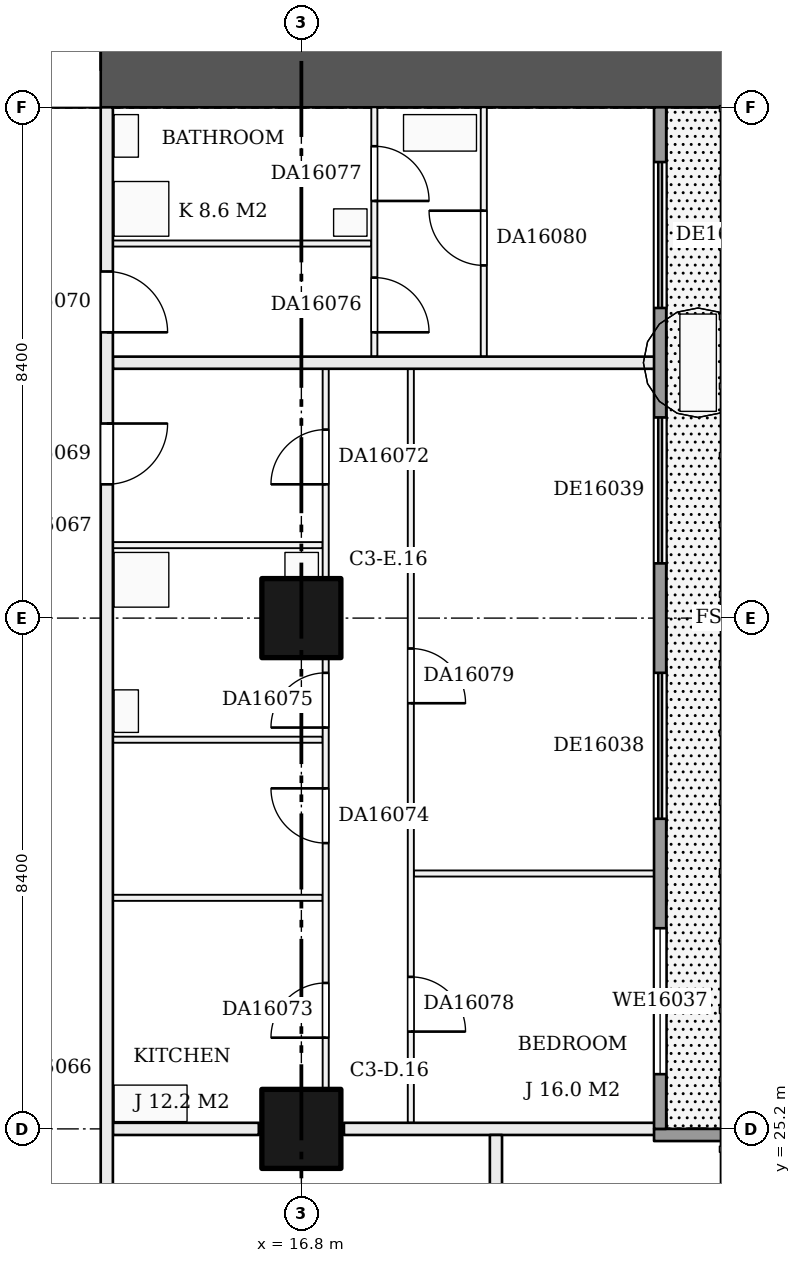
"""IFC4 building model, lengths in metres.
Left out: names, types, materials, properties, quantities, classifications, styles, units other than length and angle.
Written with IfcOpenShell. Run it as: python <this file> out.ifc"""

import sys

from ifc_helpers import new_model, si_unit, direction, frame, frame_2d, origin, origin_2d, place, context, subcontext, project, spatial, rectangle, extrude, element, fill, save


model = new_model("IFC4")
c1 = context("Model", 3, precision=1e-05, world=origin(), true_north=direction((0.0, 1.0)))
c2 = subcontext(c1, "Body", "Model", "MODEL_VIEW")
j1 = project(units=[si_unit("LENGTHUNIT", "METRE"), si_unit("PLANEANGLEUNIT", "RADIAN")], contexts=[c1])
p1 = place(None, origin())
s1 = spatial("IfcSite", under=j1, at=p1, CompositionType="ELEMENT")
p2 = place(p1, origin())
s2 = spatial("IfcBuilding", under=s1, at=p2, CompositionType="ELEMENT")
p3 = place(p2, frame((0.0, 0.0, 67.2)))
s3 = spatial("IfcBuildingStorey", under=s2, at=p3, CompositionType="ELEMENT", Elevation=67.2)
for number, where, z_axis, x_axis in (
    (1, (16.8, 25.2, 0.0), (0.0, 0.0, 1.0), (1.0, 0.0, 0.0)),
    (2, (16.8, 33.6, 0.0), (0.0, 0.0, 1.0), (1.0, 0.0, 0.0)),
):
    element("IfcColumn", number, at=place(p3, frame(where, z_axis=z_axis, x_axis=x_axis)), inside=s3, PredefinedType="COLUMN", context=c2, shape_type="SweptSolid", body=[
        extrude(rectangle(XDim=1.3, YDim=1.3, at=origin_2d()), origin(), (0.0, 0.0, 1.0), 3.22),
    ])
p4 = place(p3, frame((9.6, 42.6, 0.0), z_axis=(0.0, 0.0, 1.0), x_axis=(1.0, 0.0, 0.0)))
e3 = element("IfcWall", 3, at=p4, inside=s3, PredefinedType="SHEAR", context=c2, shape_type="SweptSolid", body=[
    extrude(rectangle(XDim=14.4, YDim=1.2, at=frame_2d((7.2, 0.0))), origin(), (0.0, 0.0, 1.0), 3.22),
])
p5 = place(p4, frame((2.1, 0.0, 0.0)))
e4 = element("IfcOpeningElement", 4, at=p5, cuts=e3, PredefinedType="OPENING", context=c2, shape_type="SweptSolid", body=[
    extrude(rectangle(XDim=1.8, YDim=2.1, at=frame_2d((0.9, 1.05))), frame((0.0, 0.61, 0.0), z_axis=(0.0, -1.0, 0.0), x_axis=(1.0, 0.0, 0.0)), (0.0, 0.0, 1.0), 1.22),
])
p6 = place(p3, frame((13.7, 25.2, 0.0), z_axis=(0.0, 0.0, 1.0), x_axis=(1.0, 0.0, 0.0)))
e5 = element("IfcWall", 5, at=p6, inside=s3, PredefinedType="PARTITIONING", context=c2, shape_type="SweptSolid", body=[
    extrude(rectangle(XDim=2.4, YDim=0.2, at=frame_2d((1.2, 0.0))), origin(), (0.0, 0.0, 1.0), 3.22),
])
p7 = place(p3, frame((17.5, 25.2, 0.0), z_axis=(0.0, 0.0, 1.0), x_axis=(1.0, 0.0, 0.0)))
e6 = element("IfcWall", 6, at=p7, inside=s3, PredefinedType="PARTITIONING", context=c2, shape_type="SweptSolid", body=[
    extrude(rectangle(XDim=5.2, YDim=0.2, at=frame_2d((2.6, 0.0))), origin(), (0.0, 0.0, 1.0), 3.22),
])
p8 = place(p3, frame((13.7, 29.0, 0.0), z_axis=(0.0, 0.0, 1.0), x_axis=(1.0, 0.0, 0.0)))
e7 = element("IfcWall", 7, at=p8, inside=s3, PredefinedType="PARTITIONING", context=c2, shape_type="SweptSolid", body=[
    extrude(rectangle(XDim=3.45, YDim=0.1, at=frame_2d((1.725, 0.0))), origin(), (0.0, 0.0, 1.0), 3.22),
])
p9 = place(p3, frame((18.65, 29.4, 0.0), z_axis=(0.0, 0.0, 1.0), x_axis=(1.0, 0.0, 0.0)))
e8 = element("IfcWall", 8, at=p9, inside=s3, PredefinedType="PARTITIONING", context=c2, shape_type="SweptSolid", body=[
    extrude(rectangle(XDim=4.05, YDim=0.1, at=frame_2d((2.025, 0.0))), origin(), (0.0, 0.0, 1.0), 3.22),
])
for number, where, z_axis, x_axis in (
    (9, (13.7, 31.6, 0.0), (0.0, 0.0, 1.0), (1.0, 0.0, 0.0)),
    (10, (13.7, 34.8, 0.0), (0.0, 0.0, 1.0), (1.0, 0.0, 0.0)),
):
    element("IfcWall", number, at=place(p3, frame(where, z_axis=z_axis, x_axis=x_axis)), inside=s3, PredefinedType="PARTITIONING", context=c2, shape_type="SweptSolid", body=[
        extrude(rectangle(XDim=3.45, YDim=0.1, at=frame_2d((1.725, 0.0))), origin(), (0.0, 0.0, 1.0), 3.22),
    ])
p10 = place(p3, frame((13.7, 37.8, 0.0), z_axis=(0.0, 0.0, 1.0), x_axis=(1.0, 0.0, 0.0)))
e11 = element("IfcWall", 11, at=p10, inside=s3, PredefinedType="PARTITIONING", context=c2, shape_type="SweptSolid", body=[
    extrude(rectangle(XDim=9.0, YDim=0.2, at=frame_2d((4.5, 0.0))), origin(), (0.0, 0.0, 1.0), 3.22),
])
p11 = place(p3, frame((13.7, 39.76, 0.0), z_axis=(0.0, 0.0, 1.0), x_axis=(1.0, 0.0, 0.0)))
e12 = element("IfcWall", 12, at=p11, inside=s3, PredefinedType="PARTITIONING", context=c2, shape_type="SweptSolid", body=[
    extrude(rectangle(XDim=4.25, YDim=0.1, at=frame_2d((2.125, 0.0))), origin(), (0.0, 0.0, 1.0), 3.22),
])
p12 = place(p3, frame((13.6, 20.8, 0.0), z_axis=(0.0, 0.0, 1.0), x_axis=(0.0, 1.0, 0.0)))
e13 = element("IfcWall", 13, at=p12, inside=s3, PredefinedType="PARTITIONING", context=c2, shape_type="SweptSolid", body=[
    extrude(rectangle(XDim=21.2, YDim=0.2, at=frame_2d((10.6, 0.0))), origin(), (0.0, 0.0, 1.0), 3.22),
])
p13 = place(p12, frame((15.0, 0.0, 0.0)))
e14 = element("IfcOpeningElement", 14, at=p13, cuts=e13, PredefinedType="OPENING", context=c2, shape_type="SweptSolid", body=[
    extrude(rectangle(XDim=1.0, YDim=2.1, at=frame_2d((0.5, 1.05))), frame((0.0, 0.11, 0.0), z_axis=(0.0, -1.0, 0.0), x_axis=(1.0, 0.0, 0.0)), (0.0, 0.0, 1.0), 0.22),
])
p14 = place(p12, frame((17.5, 0.0, 0.0)))
e15 = element("IfcOpeningElement", 15, at=p14, cuts=e13, PredefinedType="OPENING", context=c2, shape_type="SweptSolid", body=[
    extrude(rectangle(XDim=1.0, YDim=2.1, at=frame_2d((0.5, 1.05))), frame((0.0, 0.11, 0.0), z_axis=(0.0, -1.0, 0.0), x_axis=(1.0, 0.0, 0.0)), (0.0, 0.0, 1.0), 0.22),
])
p15 = place(p12, frame((1.7, 0.0, 0.0)))
e16 = element("IfcOpeningElement", 16, at=p15, cuts=e13, PredefinedType="OPENING", context=c2, shape_type="SweptSolid", body=[
    extrude(rectangle(XDim=1.0, YDim=2.1, at=frame_2d((0.5, 1.05))), frame((0.0, 0.11, 0.0), z_axis=(0.0, -1.0, 0.0), x_axis=(1.0, 0.0, 0.0)), (0.0, 0.0, 1.0), 0.22),
])
p16 = place(p3, frame((17.2, 25.3, 0.0), z_axis=(0.0, 0.0, 1.0), x_axis=(0.0, 1.0, 0.0)))
e17 = element("IfcWall", 17, at=p16, inside=s3, PredefinedType="PARTITIONING", context=c2, shape_type="SweptSolid", body=[
    extrude(rectangle(XDim=12.4, YDim=0.1, at=frame_2d((6.2, 0.0))), origin(), (0.0, 0.0, 1.0), 3.22),
])
p17 = place(p16, frame((10.5, 0.0, 0.0)))
e18 = element("IfcOpeningElement", 18, at=p17, cuts=e17, PredefinedType="OPENING", context=c2, shape_type="SweptSolid", body=[
    extrude(rectangle(XDim=0.9, YDim=2.1, at=frame_2d((0.45, 1.05))), frame((0.0, 0.06, 0.0), z_axis=(0.0, -1.0, 0.0), x_axis=(1.0, 0.0, 0.0)), (0.0, 0.0, 1.0), 0.12),
])
p18 = place(p16, frame((1.4, 0.0, 0.0)))
e19 = element("IfcOpeningElement", 19, at=p18, cuts=e17, PredefinedType="OPENING", context=c2, shape_type="SweptSolid", body=[
    extrude(rectangle(XDim=0.9, YDim=2.1, at=frame_2d((0.45, 1.05))), frame((0.0, 0.06, 0.0), z_axis=(0.0, -1.0, 0.0), x_axis=(1.0, 0.0, 0.0)), (0.0, 0.0, 1.0), 0.12),
])
p19 = place(p16, frame((4.6, 0.0, 0.0)))
e20 = element("IfcOpeningElement", 20, at=p19, cuts=e17, PredefinedType="OPENING", context=c2, shape_type="SweptSolid", body=[
    extrude(rectangle(XDim=0.9, YDim=2.1, at=frame_2d((0.45, 1.05))), frame((0.0, 0.06, 0.0), z_axis=(0.0, -1.0, 0.0), x_axis=(1.0, 0.0, 0.0)), (0.0, 0.0, 1.0), 0.12),
])
p20 = place(p16, frame((6.5, 0.0, 0.0)))
e21 = element("IfcOpeningElement", 21, at=p20, cuts=e17, PredefinedType="OPENING", context=c2, shape_type="SweptSolid", body=[
    extrude(rectangle(XDim=0.9, YDim=2.1, at=frame_2d((0.45, 1.05))), frame((0.0, 0.06, 0.0), z_axis=(0.0, -1.0, 0.0), x_axis=(1.0, 0.0, 0.0)), (0.0, 0.0, 1.0), 0.12),
])
p21 = place(p3, frame((18.0, 37.9, 0.0), z_axis=(0.0, 0.0, 1.0), x_axis=(0.0, 1.0, 0.0)))
e22 = element("IfcWall", 22, at=p21, inside=s3, PredefinedType="PARTITIONING", context=c2, shape_type="SweptSolid", body=[
    extrude(rectangle(XDim=4.1, YDim=0.1, at=frame_2d((2.05, 0.0))), origin(), (0.0, 0.0, 1.0), 3.22),
])
p22 = place(p21, frame((0.4, 0.0, 0.0)))
e23 = element("IfcOpeningElement", 23, at=p22, cuts=e22, PredefinedType="OPENING", context=c2, shape_type="SweptSolid", body=[
    extrude(rectangle(XDim=0.9, YDim=2.1, at=frame_2d((0.45, 1.05))), frame((0.0, 0.06, 0.0), z_axis=(0.0, -1.0, 0.0), x_axis=(1.0, 0.0, 0.0)), (0.0, 0.0, 1.0), 0.12),
])
p23 = place(p21, frame((2.56, 0.0, 0.0)))
e24 = element("IfcOpeningElement", 24, at=p23, cuts=e22, PredefinedType="OPENING", context=c2, shape_type="SweptSolid", body=[
    extrude(rectangle(XDim=0.9, YDim=2.1, at=frame_2d((0.45, 1.05))), frame((0.0, 0.06, 0.0), z_axis=(0.0, -1.0, 0.0), x_axis=(1.0, 0.0, 0.0)), (0.0, 0.0, 1.0), 0.12),
])
p24 = place(p3, frame((18.6, 25.3, 0.0), z_axis=(0.0, 0.0, 1.0), x_axis=(0.0, 1.0, 0.0)))
e25 = element("IfcWall", 25, at=p24, inside=s3, PredefinedType="PARTITIONING", context=c2, shape_type="SweptSolid", body=[
    extrude(rectangle(XDim=12.4, YDim=0.1, at=frame_2d((6.2, 0.0))), origin(), (0.0, 0.0, 1.0), 3.22),
])
p25 = place(p24, frame((1.5, 0.0, 0.0)))
e26 = element("IfcOpeningElement", 26, at=p25, cuts=e25, PredefinedType="OPENING", context=c2, shape_type="SweptSolid", body=[
    extrude(rectangle(XDim=0.9, YDim=2.1, at=frame_2d((0.45, 1.05))), frame((0.0, 0.06, 0.0), z_axis=(0.0, -1.0, 0.0), x_axis=(1.0, 0.0, 0.0)), (0.0, 0.0, 1.0), 0.12),
])
p26 = place(p24, frame((6.9, 0.0, 0.0)))
e27 = element("IfcOpeningElement", 27, at=p26, cuts=e25, PredefinedType="OPENING", context=c2, shape_type="SweptSolid", body=[
    extrude(rectangle(XDim=0.9, YDim=2.1, at=frame_2d((0.45, 1.05))), frame((0.0, 0.06, 0.0), z_axis=(0.0, -1.0, 0.0), x_axis=(1.0, 0.0, 0.0)), (0.0, 0.0, 1.0), 0.12),
])
p27 = place(p3, frame((19.8, 37.9, 0.0), z_axis=(0.0, 0.0, 1.0), x_axis=(0.0, 1.0, 0.0)))
e28 = element("IfcWall", 28, at=p27, inside=s3, PredefinedType="PARTITIONING", context=c2, shape_type="SweptSolid", body=[
    extrude(rectangle(XDim=4.1, YDim=0.1, at=frame_2d((2.05, 0.0))), origin(), (0.0, 0.0, 1.0), 3.22),
])
p28 = place(p27, frame((1.5, 0.0, 0.0)))
e29 = element("IfcOpeningElement", 29, at=p28, cuts=e28, PredefinedType="OPENING", context=c2, shape_type="SweptSolid", body=[
    extrude(rectangle(XDim=0.9, YDim=2.1, at=frame_2d((0.45, 1.05))), frame((0.0, 0.06, 0.0), z_axis=(0.0, -1.0, 0.0), x_axis=(1.0, 0.0, 0.0)), (0.0, 0.0, 1.0), 0.12),
])
p29 = place(p3, frame((20.0, 13.7, 0.0), z_axis=(0.0, 0.0, 1.0), x_axis=(0.0, 1.0, 0.0)))
e30 = element("IfcWall", 30, at=p29, inside=s3, PredefinedType="PARTITIONING", context=c2, shape_type="SweptSolid", body=[
    extrude(rectangle(XDim=11.4, YDim=0.2, at=frame_2d((5.7, 0.0))), origin(), (0.0, 0.0, 1.0), 3.22),
])
p30 = place(p3, frame((24.5, 25.1, 0.0), z_axis=(0.0, 0.0, 1.0), x_axis=(-1.0, 0.0, 0.0)))
e31 = element("IfcWall", 31, at=p30, inside=s3, PredefinedType="SOLIDWALL", context=c2, shape_type="SweptSolid", body=[
    extrude(rectangle(XDim=1.9, YDim=0.2, at=frame_2d((0.95, 0.0))), origin(), (0.0, 0.0, 1.0), 3.22),
])
p31 = place(p3, frame((22.7, 25.2, 0.0), z_axis=(0.0, 0.0, 1.0), x_axis=(0.0, 1.0, 0.0)))
e32 = element("IfcWall", 32, at=p31, inside=s3, PredefinedType="SOLIDWALL", context=c2, shape_type="SweptSolid", body=[
    extrude(rectangle(XDim=16.8, YDim=0.2, at=frame_2d((8.4, 0.0))), origin(), (0.0, 0.0, 1.0), 3.22),
])
p32 = place(p31, frame((0.9, 0.0, 0.9)))
e33 = element("IfcOpeningElement", 33, at=p32, cuts=e32, PredefinedType="OPENING", context=c2, shape_type="SweptSolid", body=[
    extrude(rectangle(XDim=2.4, YDim=1.5, at=frame_2d((1.2, 0.75))), frame((0.0, 0.11, 0.0), z_axis=(0.0, -1.0, 0.0), x_axis=(1.0, 0.0, 0.0)), (0.0, 0.0, 1.0), 0.22),
])
p33 = place(p31, frame((5.1, 0.0, 0.0)))
e34 = element("IfcOpeningElement", 34, at=p33, cuts=e32, PredefinedType="OPENING", context=c2, shape_type="SweptSolid", body=[
    extrude(rectangle(XDim=2.4, YDim=2.2, at=frame_2d((1.2, 1.1))), frame((0.0, 0.11, 0.0), z_axis=(0.0, -1.0, 0.0), x_axis=(1.0, 0.0, 0.0)), (0.0, 0.0, 1.0), 0.22),
])
p34 = place(p31, frame((9.3, 0.0, 0.0)))
e35 = element("IfcOpeningElement", 35, at=p34, cuts=e32, PredefinedType="OPENING", context=c2, shape_type="SweptSolid", body=[
    extrude(rectangle(XDim=2.4, YDim=2.2, at=frame_2d((1.2, 1.1))), frame((0.0, 0.11, 0.0), z_axis=(0.0, -1.0, 0.0), x_axis=(1.0, 0.0, 0.0)), (0.0, 0.0, 1.0), 0.22),
])
p35 = place(p31, frame((13.5, 0.0, 0.0)))
e36 = element("IfcOpeningElement", 36, at=p35, cuts=e32, PredefinedType="OPENING", context=c2, shape_type="SweptSolid", body=[
    extrude(rectangle(XDim=2.4, YDim=2.2, at=frame_2d((1.2, 1.1))), frame((0.0, 0.11, 0.0), z_axis=(0.0, -1.0, 0.0), x_axis=(1.0, 0.0, 0.0)), (0.0, 0.0, 1.0), 0.22),
])
p36 = place(p5, origin())
e37 = element("IfcDoor", 37, at=p36, inside=s3, OperationType="DOUBLE_DOOR_SINGLE_SWING", PredefinedType="DOOR", context=c2, shape_type="SweptSolid", body=[
    extrude(rectangle(XDim=1.8, YDim=2.1, at=frame_2d((0.9, 1.05))), frame((0.0, 0.025, 0.0), z_axis=(0.0, -1.0, 0.0), x_axis=(1.0, 0.0, 0.0)), (0.0, 0.0, 1.0), 0.05),
])
fill(e4, e37)
p37 = place(p13, frame((1.0, 0.0, 0.0), z_axis=(0.0, 0.0, 1.0), x_axis=(-1.0, 0.0, 0.0)))
e38 = element("IfcDoor", 38, at=p37, inside=s3, OperationType="SINGLE_SWING_LEFT", PredefinedType="DOOR", context=c2, shape_type="SweptSolid", body=[
    extrude(rectangle(XDim=1.0, YDim=2.1, at=frame_2d((0.5, 1.05))), frame((0.0, 0.025, 0.0), z_axis=(0.0, -1.0, 0.0), x_axis=(1.0, 0.0, 0.0)), (0.0, 0.0, 1.0), 0.05),
])
fill(e14, e38)
p38 = place(p14, frame((1.0, 0.0, 0.0), z_axis=(0.0, 0.0, 1.0), x_axis=(-1.0, 0.0, 0.0)))
e39 = element("IfcDoor", 39, at=p38, inside=s3, OperationType="SINGLE_SWING_RIGHT", PredefinedType="DOOR", context=c2, shape_type="SweptSolid", body=[
    extrude(rectangle(XDim=1.0, YDim=2.1, at=frame_2d((0.5, 1.05))), frame((0.0, 0.025, 0.0), z_axis=(0.0, -1.0, 0.0), x_axis=(1.0, 0.0, 0.0)), (0.0, 0.0, 1.0), 0.05),
])
fill(e15, e39)
p39 = place(p17, origin())
e40 = element("IfcDoor", 40, at=p39, inside=s3, OperationType="SINGLE_SWING_LEFT", PredefinedType="DOOR", context=c2, shape_type="SweptSolid", body=[
    extrude(rectangle(XDim=0.9, YDim=2.1, at=frame_2d((0.45, 1.05))), frame((0.0, 0.025, 0.0), z_axis=(0.0, -1.0, 0.0), x_axis=(1.0, 0.0, 0.0)), (0.0, 0.0, 1.0), 0.05),
])
fill(e18, e40)
p40 = place(p18, origin())
e41 = element("IfcDoor", 41, at=p40, inside=s3, OperationType="SINGLE_SWING_LEFT", PredefinedType="DOOR", context=c2, shape_type="SweptSolid", body=[
    extrude(rectangle(XDim=0.9, YDim=2.1, at=frame_2d((0.45, 1.05))), frame((0.0, 0.025, 0.0), z_axis=(0.0, -1.0, 0.0), x_axis=(1.0, 0.0, 0.0)), (0.0, 0.0, 1.0), 0.05),
])
fill(e19, e41)
p41 = place(p19, origin())
e42 = element("IfcDoor", 42, at=p41, inside=s3, OperationType="SINGLE_SWING_RIGHT", PredefinedType="DOOR", context=c2, shape_type="SweptSolid", body=[
    extrude(rectangle(XDim=0.9, YDim=2.1, at=frame_2d((0.45, 1.05))), frame((0.0, 0.025, 0.0), z_axis=(0.0, -1.0, 0.0), x_axis=(1.0, 0.0, 0.0)), (0.0, 0.0, 1.0), 0.05),
])
fill(e20, e42)
p42 = place(p20, origin())
e43 = element("IfcDoor", 43, at=p42, inside=s3, OperationType="SINGLE_SWING_LEFT", PredefinedType="DOOR", context=c2, shape_type="SweptSolid", body=[
    extrude(rectangle(XDim=0.9, YDim=2.1, at=frame_2d((0.45, 1.05))), frame((0.0, 0.025, 0.0), z_axis=(0.0, -1.0, 0.0), x_axis=(1.0, 0.0, 0.0)), (0.0, 0.0, 1.0), 0.05),
])
fill(e21, e43)
p43 = place(p22, frame((0.9, 0.0, 0.0), z_axis=(0.0, 0.0, 1.0), x_axis=(-1.0, 0.0, 0.0)))
e44 = element("IfcDoor", 44, at=p43, inside=s3, OperationType="SINGLE_SWING_RIGHT", PredefinedType="DOOR", context=c2, shape_type="SweptSolid", body=[
    extrude(rectangle(XDim=0.9, YDim=2.1, at=frame_2d((0.45, 1.05))), frame((0.0, 0.025, 0.0), z_axis=(0.0, -1.0, 0.0), x_axis=(1.0, 0.0, 0.0)), (0.0, 0.0, 1.0), 0.05),
])
fill(e23, e44)
p44 = place(p23, frame((0.9, 0.0, 0.0), z_axis=(0.0, 0.0, 1.0), x_axis=(-1.0, 0.0, 0.0)))
e45 = element("IfcDoor", 45, at=p44, inside=s3, OperationType="SINGLE_SWING_RIGHT", PredefinedType="DOOR", context=c2, shape_type="SweptSolid", body=[
    extrude(rectangle(XDim=0.9, YDim=2.1, at=frame_2d((0.45, 1.05))), frame((0.0, 0.025, 0.0), z_axis=(0.0, -1.0, 0.0), x_axis=(1.0, 0.0, 0.0)), (0.0, 0.0, 1.0), 0.05),
])
fill(e24, e45)
p45 = place(p25, frame((0.9, 0.0, 0.0), z_axis=(0.0, 0.0, 1.0), x_axis=(-1.0, 0.0, 0.0)))
e46 = element("IfcDoor", 46, at=p45, inside=s3, OperationType="SINGLE_SWING_RIGHT", PredefinedType="DOOR", context=c2, shape_type="SweptSolid", body=[
    extrude(rectangle(XDim=0.9, YDim=2.1, at=frame_2d((0.45, 1.05))), frame((0.0, 0.025, 0.0), z_axis=(0.0, -1.0, 0.0), x_axis=(1.0, 0.0, 0.0)), (0.0, 0.0, 1.0), 0.05),
])
fill(e26, e46)
p46 = place(p26, frame((0.9, 0.0, 0.0), z_axis=(0.0, 0.0, 1.0), x_axis=(-1.0, 0.0, 0.0)))
e47 = element("IfcDoor", 47, at=p46, inside=s3, OperationType="SINGLE_SWING_RIGHT", PredefinedType="DOOR", context=c2, shape_type="SweptSolid", body=[
    extrude(rectangle(XDim=0.9, YDim=2.1, at=frame_2d((0.45, 1.05))), frame((0.0, 0.025, 0.0), z_axis=(0.0, -1.0, 0.0), x_axis=(1.0, 0.0, 0.0)), (0.0, 0.0, 1.0), 0.05),
])
fill(e27, e47)
p47 = place(p28, origin())
e48 = element("IfcDoor", 48, at=p47, inside=s3, OperationType="SINGLE_SWING_RIGHT", PredefinedType="DOOR", context=c2, shape_type="SweptSolid", body=[
    extrude(rectangle(XDim=0.9, YDim=2.1, at=frame_2d((0.45, 1.05))), frame((0.0, 0.025, 0.0), z_axis=(0.0, -1.0, 0.0), x_axis=(1.0, 0.0, 0.0)), (0.0, 0.0, 1.0), 0.05),
])
fill(e29, e48)
p48 = place(p32, origin())
e49 = element("IfcWindow", 49, at=p48, inside=s3, PartitioningType="SINGLE_PANEL", PredefinedType="WINDOW", context=c2, shape_type="SweptSolid", body=[
    extrude(rectangle(XDim=2.4, YDim=1.5, at=frame_2d((1.2, 0.75))), frame((0.0, 0.03, 0.0), z_axis=(0.0, -1.0, 0.0), x_axis=(1.0, 0.0, 0.0)), (0.0, 0.0, 1.0), 0.06),
])
fill(e33, e49)
p49 = place(p33, origin())
e50 = element("IfcDoor", 50, at=p49, inside=s3, OperationType="DOUBLE_DOOR_SLIDING", PredefinedType="DOOR", context=c2, shape_type="SweptSolid", body=[
    extrude(rectangle(XDim=2.4, YDim=2.2, at=frame_2d((1.2, 1.1))), frame((0.0, 0.025, 0.0), z_axis=(0.0, -1.0, 0.0), x_axis=(1.0, 0.0, 0.0)), (0.0, 0.0, 1.0), 0.05),
])
fill(e34, e50)
p50 = place(p34, origin())
e51 = element("IfcDoor", 51, at=p50, inside=s3, OperationType="DOUBLE_DOOR_SLIDING", PredefinedType="DOOR", context=c2, shape_type="SweptSolid", body=[
    extrude(rectangle(XDim=2.4, YDim=2.2, at=frame_2d((1.2, 1.1))), frame((0.0, 0.025, 0.0), z_axis=(0.0, -1.0, 0.0), x_axis=(1.0, 0.0, 0.0)), (0.0, 0.0, 1.0), 0.05),
])
fill(e35, e51)
p51 = place(p35, origin())
e52 = element("IfcDoor", 52, at=p51, inside=s3, OperationType="DOUBLE_DOOR_SLIDING", PredefinedType="DOOR", context=c2, shape_type="SweptSolid", body=[
    extrude(rectangle(XDim=2.4, YDim=2.2, at=frame_2d((1.2, 1.1))), frame((0.0, 0.025, 0.0), z_axis=(0.0, -1.0, 0.0), x_axis=(1.0, 0.0, 0.0)), (0.0, 0.0, 1.0), 0.05),
])
fill(e36, e52)
save(model, sys.argv[1])
